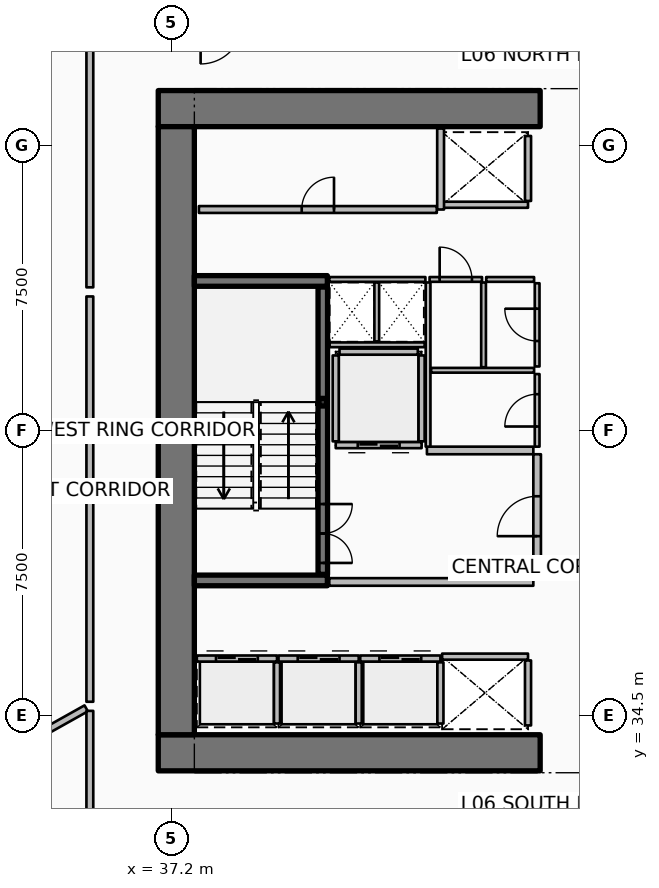
"""IFC4 building model, lengths in metres.
Left out: names, types, materials, properties, quantities, classifications, styles, units other than length and angle.
Written with IfcOpenShell. Run it as: python <this file> out.ifc"""

import sys

from ifc_helpers import new_model, si_unit, direction, frame, frame_2d, origin, origin_2d, place, context, subcontext, project, spatial, rectangle, hollow_rectangle, extrude, element, fill, save


model = new_model("IFC4")
c1 = context("Model", 3, precision=1e-05, world=origin(), true_north=direction((0.0, 1.0)))
c2 = subcontext(c1, "Body", "Model", "MODEL_VIEW")
j1 = project(units=[si_unit("LENGTHUNIT", "METRE"), si_unit("PLANEANGLEUNIT", "RADIAN")], contexts=[c1])
p1 = place(None, origin())
s1 = spatial("IfcSite", under=j1, at=p1, CompositionType="ELEMENT")
p2 = place(p1, origin())
s2 = spatial("IfcBuilding", under=s1, at=p2, CompositionType="ELEMENT")
p3 = place(p2, frame((0.0, 0.0, 30.15)))
s3 = spatial("IfcBuildingStorey", under=s2, at=p3, CompositionType="ELEMENT", Elevation=30.15)
for number, where, z_axis, x_axis in (
    (1, (36.85, 33.525, 0.0), (0.0, 0.0, 1.0), (1.0, 0.0, 0.0)),
    (2, (36.85, 50.475, 0.0), (0.0, 0.0, 1.0), (1.0, 0.0, 0.0)),
):
    element("IfcWall", number, at=place(p3, frame(where, z_axis=z_axis, x_axis=x_axis)), inside=s3, PredefinedType="SHEAR", context=c2, shape_type="SweptSolid", body=[
        extrude(rectangle(XDim=10.05, YDim=0.95, at=frame_2d((5.025, 0.0))), origin(), (0.0, 0.0, 1.0), 3.75),
    ])
p4 = place(p3, frame((37.325, 34.0, 0.0), z_axis=(0.0, 0.0, 1.0), x_axis=(0.0, 1.0, 0.0)))
e3 = element("IfcWall", 3, at=p4, inside=s3, PredefinedType="SHEAR", context=c2, shape_type="SweptSolid", body=[
    extrude(rectangle(XDim=16.0, YDim=0.95, at=frame_2d((8.0, 0.0))), origin(), (0.0, 0.0, 1.0), 3.75),
])
for number, where, z_axis, x_axis in (
    (4, (37.8, 38.06, 0.0), (0.0, 0.0, 1.0), (1.0, 0.0, 0.0)),
    (5, (37.8, 45.94, 0.0), (0.0, 0.0, 1.0), (1.0, 0.0, 0.0)),
):
    element("IfcWall", number, at=place(p3, frame(where, z_axis=z_axis, x_axis=x_axis)), inside=s3, PredefinedType="SHEAR", context=c2, shape_type="SweptSolid", body=[
        extrude(rectangle(XDim=3.5, YDim=0.28, at=frame_2d((1.75, 0.0))), origin(), (0.0, 0.0, 1.0), 3.75),
    ])
p5 = place(p3, frame((41.18, 42.75, 0.0), z_axis=(0.0, 0.0, 1.0), x_axis=(1.0, 0.0, 0.0)))
e6 = element("IfcColumn", 6, at=p5, inside=s3, PredefinedType="COLUMN", context=c2, shape_type="SweptSolid", body=[
    extrude(hollow_rectangle(XDim=0.2, YDim=0.2, WallThickness=0.01, InnerFilletRadius=0.01, OuterFilletRadius=0.02, at=origin_2d()), origin(), (0.0, 0.0, 1.0), 1.67),
])
p6 = place(p3, frame((41.18, 38.22, 0.0), z_axis=(0.0, 0.0, 1.0), x_axis=(0.0, 1.0, 0.0)))
e7 = element("IfcWall", 7, at=p6, inside=s3, PredefinedType="SOLIDWALL", context=c2, shape_type="SweptSolid", body=[
    extrude(rectangle(XDim=7.56, YDim=0.25, at=frame_2d((3.78, 0.0))), origin(), (0.0, 0.0, 1.0), 3.5),
])
p7 = place(p6, frame((0.3, 0.0, 0.0)))
e8 = element("IfcOpeningElement", 8, at=p7, cuts=e7, PredefinedType="OPENING", context=c2, shape_type="SweptSolid", body=[
    extrude(rectangle(XDim=1.55, YDim=2.15, at=frame_2d((0.775, 1.075))), frame((0.0, 0.135, 0.0), z_axis=(0.0, -1.0, 0.0), x_axis=(1.0, 0.0, 0.0)), (0.0, 0.0, 1.0), 0.27),
])
p8 = place(p3, frame((37.865, 36.005, 0.0), z_axis=(0.0, 0.0, 1.0), x_axis=(1.0, 0.0, 0.0)))
e9 = element("IfcWall", 9, at=p8, inside=s3, PredefinedType="PARTITIONING", context=c2, shape_type="SweptSolid", body=[
    extrude(rectangle(XDim=2.11, YDim=0.16, at=frame_2d((1.055, 0.0))), origin(), (0.0, 0.0, 1.0), 3.5),
])
p9 = place(p8, frame((0.505, 0.0, 0.0)))
e10 = element("IfcOpeningElement", 10, at=p9, cuts=e9, PredefinedType="OPENING", context=c2, shape_type="SweptSolid", body=[
    extrude(rectangle(XDim=1.1, YDim=2.1, at=frame_2d((0.55, 1.05))), frame((0.0, 0.09, 0.0), z_axis=(0.0, -1.0, 0.0), x_axis=(1.0, 0.0, 0.0)), (0.0, 0.0, 1.0), 0.18),
])
p10 = place(p3, frame((39.975, 34.295, 0.0), z_axis=(0.0, 0.0, 1.0), x_axis=(0.0, 1.0, 0.0)))
e11 = element("IfcWall", 11, at=p10, inside=s3, PredefinedType="PARTITIONING", context=c2, shape_type="SweptSolid", body=[
    extrude(rectangle(XDim=1.61, YDim=0.16, at=frame_2d((0.805, 0.0))), origin(), (0.0, 0.0, 1.0), 3.5),
])
p11 = place(p3, frame((40.015, 36.005, 0.0), z_axis=(0.0, 0.0, 1.0), x_axis=(1.0, 0.0, 0.0)))
e12 = element("IfcWall", 12, at=p11, inside=s3, PredefinedType="PARTITIONING", context=c2, shape_type="SweptSolid", body=[
    extrude(rectangle(XDim=2.11, YDim=0.16, at=frame_2d((1.055, 0.0))), origin(), (0.0, 0.0, 1.0), 3.5),
])
p12 = place(p11, frame((0.505, 0.0, 0.0)))
e13 = element("IfcOpeningElement", 13, at=p12, cuts=e12, PredefinedType="OPENING", context=c2, shape_type="SweptSolid", body=[
    extrude(rectangle(XDim=1.1, YDim=2.1, at=frame_2d((0.55, 1.05))), frame((0.0, 0.09, 0.0), z_axis=(0.0, -1.0, 0.0), x_axis=(1.0, 0.0, 0.0)), (0.0, 0.0, 1.0), 0.18),
])
p13 = place(p3, frame((42.125, 34.295, 0.0), z_axis=(0.0, 0.0, 1.0), x_axis=(0.0, 1.0, 0.0)))
e14 = element("IfcWall", 14, at=p13, inside=s3, PredefinedType="PARTITIONING", context=c2, shape_type="SweptSolid", body=[
    extrude(rectangle(XDim=1.61, YDim=0.16, at=frame_2d((0.805, 0.0))), origin(), (0.0, 0.0, 1.0), 3.5),
])
p14 = place(p3, frame((42.165, 36.005, 0.0), z_axis=(0.0, 0.0, 1.0), x_axis=(1.0, 0.0, 0.0)))
e15 = element("IfcWall", 15, at=p14, inside=s3, PredefinedType="PARTITIONING", context=c2, shape_type="SweptSolid", body=[
    extrude(rectangle(XDim=2.11, YDim=0.16, at=frame_2d((1.055, 0.0))), origin(), (0.0, 0.0, 1.0), 3.5),
])
p15 = place(p14, frame((0.505, 0.0, 0.0)))
e16 = element("IfcOpeningElement", 16, at=p15, cuts=e15, PredefinedType="OPENING", context=c2, shape_type="SweptSolid", body=[
    extrude(rectangle(XDim=1.1, YDim=2.1, at=frame_2d((0.55, 1.05))), frame((0.0, 0.09, 0.0), z_axis=(0.0, -1.0, 0.0), x_axis=(1.0, 0.0, 0.0)), (0.0, 0.0, 1.0), 0.18),
])
p16 = place(p3, frame((44.275, 34.295, 0.0), z_axis=(0.0, 0.0, 1.0), x_axis=(0.0, 1.0, 0.0)))
e17 = element("IfcWall", 17, at=p16, inside=s3, PredefinedType="PARTITIONING", context=c2, shape_type="SweptSolid", body=[
    extrude(rectangle(XDim=1.61, YDim=0.16, at=frame_2d((0.805, 0.0))), origin(), (0.0, 0.0, 1.0), 3.5),
])
p17 = place(p3, frame((46.58, 47.945, 0.0), z_axis=(0.0, 0.0, 1.0), x_axis=(-1.0, 0.0, 0.0)))
e18 = element("IfcWall", 18, at=p17, inside=s3, PredefinedType="PARTITIONING", context=c2, shape_type="SweptSolid", body=[
    extrude(rectangle(XDim=2.26, YDim=0.16, at=frame_2d((1.13, 0.0))), origin(), (0.0, 0.0, 1.0), 3.5),
])
p18 = place(p3, frame((46.58, 48.045, 0.0), z_axis=(0.0, 0.0, 1.0), x_axis=(0.0, 1.0, 0.0)))
e19 = element("IfcWall", 19, at=p18, inside=s3, PredefinedType="PARTITIONING", context=c2, shape_type="SweptSolid", body=[
    extrude(rectangle(XDim=1.71, YDim=0.16, at=frame_2d((0.855, 0.0))), origin(), (0.0, 0.0, 1.0), 3.5),
])
p19 = place(p3, frame((44.32, 36.055, 0.0), z_axis=(0.0, 0.0, 1.0), x_axis=(1.0, 0.0, 0.0)))
e20 = element("IfcWall", 20, at=p19, inside=s3, PredefinedType="PARTITIONING", context=c2, shape_type="SweptSolid", body=[
    extrude(rectangle(XDim=2.26, YDim=0.16, at=frame_2d((1.13, 0.0))), origin(), (0.0, 0.0, 1.0), 3.5),
])
p20 = place(p3, frame((46.58, 34.245, 0.0), z_axis=(0.0, 0.0, 1.0), x_axis=(0.0, 1.0, 0.0)))
e21 = element("IfcWall", 21, at=p20, inside=s3, PredefinedType="PARTITIONING", context=c2, shape_type="SweptSolid", body=[
    extrude(rectangle(XDim=1.71, YDim=0.16, at=frame_2d((0.855, 0.0))), origin(), (0.0, 0.0, 1.0), 3.5),
])
p21 = place(p3, frame((43.78, 41.62, 0.0), z_axis=(0.0, 0.0, 1.0), x_axis=(-1.0, 0.0, 0.0)))
e22 = element("IfcWall", 22, at=p21, inside=s3, PredefinedType="PARTITIONING", context=c2, shape_type="SweptSolid", body=[
    extrude(rectangle(XDim=2.26, YDim=0.16, at=frame_2d((1.13, 0.0))), origin(), (0.0, 0.0, 1.0), 3.5),
])
p22 = place(p21, frame((0.58, 0.0, 0.0)))
e23 = element("IfcOpeningElement", 23, at=p22, cuts=e22, PredefinedType="OPENING", context=c2, shape_type="SweptSolid", body=[
    extrude(rectangle(XDim=1.1, YDim=2.1, at=frame_2d((0.55, 1.05))), frame((0.0, 0.09, 0.0), z_axis=(0.0, -1.0, 0.0), x_axis=(1.0, 0.0, 0.0)), (0.0, 0.0, 1.0), 0.18),
])
for number, where, z_axis, x_axis in (
    (24, (43.78, 41.72, 0.0), (0.0, 0.0, 1.0), (0.0, 1.0, 0.0)),
    (25, (41.52, 41.72, 0.0), (0.0, 0.0, 1.0), (0.0, 1.0, 0.0)),
):
    element("IfcWall", number, at=place(p3, frame(where, z_axis=z_axis, x_axis=x_axis)), inside=s3, PredefinedType="PARTITIONING", context=c2, shape_type="SweptSolid", body=[
        extrude(rectangle(XDim=2.26, YDim=0.16, at=frame_2d((1.13, 0.0))), origin(), (0.0, 0.0, 1.0), 3.5),
    ])
p23 = place(p3, frame((41.62, 44.08, 0.0), z_axis=(0.0, 0.0, 1.0), x_axis=(1.0, 0.0, 0.0)))
e26 = element("IfcWall", 26, at=p23, inside=s3, PredefinedType="PARTITIONING", context=c2, shape_type="SweptSolid", body=[
    extrude(rectangle(XDim=2.06, YDim=0.16, at=frame_2d((1.03, 0.0))), origin(), (0.0, 0.0, 1.0), 3.5),
])
p24 = place(p3, frame((37.92, 47.82, 0.0), z_axis=(0.0, 0.0, 1.0), x_axis=(1.0, 0.0, 0.0)))
e27 = element("IfcWall", 27, at=p24, inside=s3, PredefinedType="PARTITIONING", context=c2, shape_type="SweptSolid", body=[
    extrude(rectangle(XDim=6.26, YDim=0.18, at=frame_2d((3.13, 0.0))), origin(), (0.0, 0.0, 1.0), 3.5),
])
p25 = place(p24, frame((2.705, 0.0, 0.0)))
e28 = element("IfcOpeningElement", 28, at=p25, cuts=e27, PredefinedType="OPENING", context=c2, shape_type="SweptSolid", body=[
    extrude(rectangle(XDim=0.85, YDim=2.06, at=frame_2d((0.425, 1.03))), frame((0.0, 0.1, 0.0), z_axis=(0.0, -1.0, 0.0), x_axis=(1.0, 0.0, 0.0)), (0.0, 0.0, 1.0), 0.2),
])
p26 = place(p3, frame((44.28, 47.82, 0.0), z_axis=(0.0, 0.0, 1.0), x_axis=(0.0, 1.0, 0.0)))
e29 = element("IfcWall", 29, at=p26, inside=s3, PredefinedType="PARTITIONING", context=c2, shape_type="SweptSolid", body=[
    extrude(rectangle(XDim=2.13, YDim=0.18, at=frame_2d((1.065, 0.0))), origin(), (0.0, 0.0, 1.0), 3.5),
])
p27 = place(p3, frame((41.35, 38.02, 0.0), z_axis=(0.0, 0.0, 1.0), x_axis=(1.0, 0.0, 0.0)))
e30 = element("IfcWall", 30, at=p27, inside=s3, PredefinedType="PARTITIONING", context=c2, shape_type="SweptSolid", body=[
    extrude(rectangle(XDim=5.37, YDim=0.2, at=frame_2d((2.685, 0.0))), origin(), (0.0, 0.0, 1.0), 3.5),
])
p28 = place(p3, frame((43.92, 41.48, 0.0), z_axis=(0.0, 0.0, 1.0), x_axis=(1.0, 0.0, 0.0)))
e31 = element("IfcWall", 31, at=p28, inside=s3, PredefinedType="PARTITIONING", context=c2, shape_type="SweptSolid", body=[
    extrude(rectangle(XDim=2.8, YDim=0.2, at=frame_2d((1.4, 0.0))), origin(), (0.0, 0.0, 1.0), 3.5),
])
p29 = place(p3, frame((46.82, 38.12, 0.0), z_axis=(0.0, 0.0, 1.0), x_axis=(0.0, 1.0, 0.0)))
e32 = element("IfcWall", 32, at=p29, inside=s3, PredefinedType="PARTITIONING", context=c2, shape_type="SweptSolid", body=[
    extrude(rectangle(XDim=3.26, YDim=0.2, at=frame_2d((1.63, 0.0))), origin(), (0.0, 0.0, 1.0), 3.5),
])
p30 = place(p29, frame((1.105, 0.0, 0.0)))
e33 = element("IfcOpeningElement", 33, at=p30, cuts=e32, PredefinedType="OPENING", context=c2, shape_type="SweptSolid", body=[
    extrude(rectangle(XDim=1.05, YDim=2.1, at=frame_2d((0.525, 1.05))), frame((0.0, 0.11, 0.0), z_axis=(0.0, -1.0, 0.0), x_axis=(1.0, 0.0, 0.0)), (0.0, 0.0, 1.0), 0.22),
])
p31 = place(p3, frame((41.36, 44.26, 0.0), z_axis=(0.0, 0.0, 1.0), x_axis=(1.0, 0.0, 0.0)))
e34 = element("IfcWall", 34, at=p31, inside=s3, PredefinedType="PARTITIONING", context=c2, shape_type="SweptSolid", body=[
    extrude(rectangle(XDim=2.5, YDim=0.125, at=frame_2d((1.25, 0.0))), origin(), (0.0, 0.0, 1.0), 2.94),
])
p32 = place(p3, frame((42.6, 44.35, 0.0), z_axis=(0.0, 0.0, 1.0), x_axis=(0.0, 1.0, 0.0)))
e35 = element("IfcWall", 35, at=p32, inside=s3, PredefinedType="PARTITIONING", context=c2, shape_type="SweptSolid", body=[
    extrude(rectangle(XDim=1.55, YDim=0.125, at=frame_2d((0.775, 0.0))), origin(), (0.0, 0.0, 1.0), 2.94),
])
p33 = place(p3, frame((43.95, 41.58, 0.0), z_axis=(0.0, 0.0, 1.0), x_axis=(0.0, 1.0, 0.0)))
e36 = element("IfcWall", 36, at=p33, inside=s3, PredefinedType="PARTITIONING", context=c2, shape_type="SweptSolid", body=[
    extrude(rectangle(XDim=4.32, YDim=0.125, at=frame_2d((2.16, 0.0))), origin(), (0.0, 0.0, 1.0), 2.94),
])
p34 = place(p3, frame((44.03, 43.59, 0.0), z_axis=(0.0, 0.0, 1.0), x_axis=(1.0, 0.0, 0.0)))
e37 = element("IfcWall", 37, at=p34, inside=s3, PredefinedType="PARTITIONING", context=c2, shape_type="SweptSolid", body=[
    extrude(rectangle(XDim=2.71, YDim=0.125, at=frame_2d((1.355, 0.0))), origin(), (0.0, 0.0, 1.0), 2.94),
])
p35 = place(p3, frame((45.41, 43.67, 0.0), z_axis=(0.0, 0.0, 1.0), x_axis=(0.0, 1.0, 0.0)))
e38 = element("IfcWall", 38, at=p35, inside=s3, PredefinedType="PARTITIONING", context=c2, shape_type="SweptSolid", body=[
    extrude(rectangle(XDim=2.23, YDim=0.125, at=frame_2d((1.115, 0.0))), origin(), (0.0, 0.0, 1.0), 2.94),
])
p36 = place(p3, frame((46.82, 41.58, 0.0), z_axis=(0.0, 0.0, 1.0), x_axis=(0.0, 1.0, 0.0)))
e39 = element("IfcWall", 39, at=p36, inside=s3, PredefinedType="PARTITIONING", context=c2, shape_type="SweptSolid", body=[
    extrude(rectangle(XDim=1.91, YDim=0.125, at=frame_2d((0.955, 0.0))), origin(), (0.0, 0.0, 1.0), 2.94),
])
p37 = place(p36, frame((0.53, 0.0, 0.0)))
e40 = element("IfcOpeningElement", 40, at=p37, cuts=e39, PredefinedType="OPENING", context=c2, shape_type="SweptSolid", body=[
    extrude(rectangle(XDim=0.85, YDim=2.06, at=frame_2d((0.425, 1.03))), frame((0.0, 0.073, 0.0), z_axis=(0.0, -1.0, 0.0), x_axis=(1.0, 0.0, 0.0)), (0.0, 0.0, 1.0), 0.145),
])
p38 = place(p3, frame((46.82, 43.69, 0.0), z_axis=(0.0, 0.0, 1.0), x_axis=(0.0, 1.0, 0.0)))
e41 = element("IfcWall", 41, at=p38, inside=s3, PredefinedType="PARTITIONING", context=c2, shape_type="SweptSolid", body=[
    extrude(rectangle(XDim=2.19, YDim=0.125, at=frame_2d((1.095, 0.0))), origin(), (0.0, 0.0, 1.0), 2.94),
])
p39 = place(p38, frame((0.67, 0.0, 0.0)))
e42 = element("IfcOpeningElement", 42, at=p39, cuts=e41, PredefinedType="OPENING", context=c2, shape_type="SweptSolid", body=[
    extrude(rectangle(XDim=0.85, YDim=2.06, at=frame_2d((0.425, 1.03))), frame((0.0, 0.073, 0.0), z_axis=(0.0, -1.0, 0.0), x_axis=(1.0, 0.0, 0.0)), (0.0, 0.0, 1.0), 0.145),
])
p40 = place(p3, frame((41.35, 45.98, 0.0), z_axis=(0.0, 0.0, 1.0), x_axis=(1.0, 0.0, 0.0)))
e43 = element("IfcWall", 43, at=p40, inside=s3, PredefinedType="PARTITIONING", context=c2, shape_type="SweptSolid", body=[
    extrude(rectangle(XDim=2.53, YDim=0.125, at=frame_2d((1.265, 0.0))), origin(), (0.0, 0.0, 1.0), 2.94),
])
p41 = place(p3, frame((43.99, 45.98, 0.0), z_axis=(0.0, 0.0, 1.0), x_axis=(1.0, 0.0, 0.0)))
e44 = element("IfcWall", 44, at=p41, inside=s3, PredefinedType="PARTITIONING", context=c2, shape_type="SweptSolid", body=[
    extrude(rectangle(XDim=1.38, YDim=0.125, at=frame_2d((0.69, 0.0))), origin(), (0.0, 0.0, 1.0), 2.94),
])
p42 = place(p41, frame((0.265, 0.0, 0.0)))
e45 = element("IfcOpeningElement", 45, at=p42, cuts=e44, PredefinedType="OPENING", context=c2, shape_type="SweptSolid", body=[
    extrude(rectangle(XDim=0.85, YDim=2.06, at=frame_2d((0.425, 1.03))), frame((0.0, 0.073, 0.0), z_axis=(0.0, -1.0, 0.0), x_axis=(1.0, 0.0, 0.0)), (0.0, 0.0, 1.0), 0.145),
])
p43 = place(p3, frame((45.48, 45.98, 0.0), z_axis=(0.0, 0.0, 1.0), x_axis=(1.0, 0.0, 0.0)))
e46 = element("IfcWall", 46, at=p43, inside=s3, PredefinedType="PARTITIONING", context=c2, shape_type="SweptSolid", body=[
    extrude(rectangle(XDim=1.26, YDim=0.125, at=frame_2d((0.63, 0.0))), origin(), (0.0, 0.0, 1.0), 2.94),
])
p44 = place(p3, frame((34.954, 34.694, 0.0), z_axis=(0.0, 0.0, 1.0), x_axis=(-0.872493465611, -0.488625779577, 0.0)))
e47 = element("IfcWall", 47, at=p44, inside=s3, PredefinedType="PARTITIONING", context=c2, shape_type="SweptSolid", body=[
    extrude(rectangle(XDim=16.586, YDim=0.18, at=frame_2d((8.293, 0.0))), origin(), (0.0, 0.0, 1.0), 2.867),
])
p45 = place(p3, frame((35.05, 52.089, 0.0), z_axis=(0.0, 0.0, 1.0), x_axis=(0.0, -1.0, 0.0)))
e48 = element("IfcWall", 48, at=p45, inside=s3, PredefinedType="PARTITIONING", context=c2, shape_type="SweptSolid", body=[
    extrude(rectangle(XDim=6.317, YDim=0.18, at=frame_2d((3.158, 0.0))), origin(), (0.0, 0.0, 1.0), 2.867),
])
p46 = place(p3, frame((35.05, 45.532, 0.0), z_axis=(0.0, 0.0, 1.0), x_axis=(0.0, -1.0, 0.0)))
e49 = element("IfcWall", 49, at=p46, inside=s3, PredefinedType="PARTITIONING", context=c2, shape_type="SweptSolid", body=[
    extrude(rectangle(XDim=4.945, YDim=0.18, at=frame_2d((2.472, 0.0))), origin(), (0.0, 0.0, 1.0), 2.867),
])
p47 = place(p3, frame((35.05, 40.347, 0.0), z_axis=(0.0, 0.0, 1.0), x_axis=(0.0, -1.0, 0.0)))
e50 = element("IfcWall", 50, at=p47, inside=s3, PredefinedType="PARTITIONING", context=c2, shape_type="SweptSolid", body=[
    extrude(rectangle(XDim=5.48, YDim=0.18, at=frame_2d((2.74, 0.0))), origin(), (0.0, 0.0, 1.0), 2.867),
])
p48 = place(p3, frame((35.05, 34.628, 0.0), z_axis=(0.0, 0.0, 1.0), x_axis=(0.0, -1.0, 0.0)))
e51 = element("IfcWall", 51, at=p48, inside=s3, PredefinedType="PARTITIONING", context=c2, shape_type="SweptSolid", body=[
    extrude(rectangle(XDim=3.258, YDim=0.18, at=frame_2d((1.629, 0.0))), origin(), (0.0, 0.0, 1.0), 2.867),
])
p49 = place(p7, origin())
e52 = element("IfcDoor", 52, at=p49, inside=s3, OperationType="DOUBLE_DOOR_SINGLE_SWING", PredefinedType="DOOR", context=c2, shape_type="SweptSolid", body=[
    extrude(rectangle(XDim=1.55, YDim=2.15, at=frame_2d((0.775, 1.075))), frame((0.0, 0.025, 0.0), z_axis=(0.0, -1.0, 0.0), x_axis=(1.0, 0.0, 0.0)), (0.0, 0.0, 1.0), 0.05),
])
fill(e8, e52)
p50 = place(p9, origin())
e53 = element("IfcDoor", 53, at=p50, inside=s3, OperationType="DOUBLE_DOOR_SLIDING", PredefinedType="DOOR", context=c2, shape_type="SweptSolid", body=[
    extrude(rectangle(XDim=1.1, YDim=2.1, at=frame_2d((0.55, 1.05))), frame((0.0, 0.025, 0.0), z_axis=(0.0, -1.0, 0.0), x_axis=(1.0, 0.0, 0.0)), (0.0, 0.0, 1.0), 0.05),
])
fill(e10, e53)
p51 = place(p12, origin())
e54 = element("IfcDoor", 54, at=p51, inside=s3, OperationType="DOUBLE_DOOR_SLIDING", PredefinedType="DOOR", context=c2, shape_type="SweptSolid", body=[
    extrude(rectangle(XDim=1.1, YDim=2.1, at=frame_2d((0.55, 1.05))), frame((0.0, 0.025, 0.0), z_axis=(0.0, -1.0, 0.0), x_axis=(1.0, 0.0, 0.0)), (0.0, 0.0, 1.0), 0.05),
])
fill(e13, e54)
p52 = place(p15, origin())
e55 = element("IfcDoor", 55, at=p52, inside=s3, OperationType="DOUBLE_DOOR_SLIDING", PredefinedType="DOOR", context=c2, shape_type="SweptSolid", body=[
    extrude(rectangle(XDim=1.1, YDim=2.1, at=frame_2d((0.55, 1.05))), frame((0.0, 0.025, 0.0), z_axis=(0.0, -1.0, 0.0), x_axis=(1.0, 0.0, 0.0)), (0.0, 0.0, 1.0), 0.05),
])
fill(e16, e55)
p53 = place(p22, origin())
e56 = element("IfcDoor", 56, at=p53, inside=s3, OperationType="DOUBLE_DOOR_SLIDING", PredefinedType="DOOR", context=c2, shape_type="SweptSolid", body=[
    extrude(rectangle(XDim=1.1, YDim=2.1, at=frame_2d((0.55, 1.05))), frame((0.0, 0.025, 0.0), z_axis=(0.0, -1.0, 0.0), x_axis=(1.0, 0.0, 0.0)), (0.0, 0.0, 1.0), 0.05),
])
fill(e23, e56)
p54 = place(p25, origin())
e57 = element("IfcDoor", 57, at=p54, inside=s3, OperationType="SINGLE_SWING_RIGHT", PredefinedType="DOOR", context=c2, shape_type="SweptSolid", body=[
    extrude(rectangle(XDim=0.85, YDim=2.06, at=frame_2d((0.425, 1.03))), frame((0.0, 0.025, 0.0), z_axis=(0.0, -1.0, 0.0), x_axis=(1.0, 0.0, 0.0)), (0.0, 0.0, 1.0), 0.05),
])
fill(e28, e57)
p55 = place(p30, origin())
e58 = element("IfcDoor", 58, at=p55, inside=s3, OperationType="SINGLE_SWING_LEFT", PredefinedType="DOOR", context=c2, shape_type="SweptSolid", body=[
    extrude(rectangle(XDim=1.05, YDim=2.1, at=frame_2d((0.525, 1.05))), frame((0.0, 0.025, 0.0), z_axis=(0.0, -1.0, 0.0), x_axis=(1.0, 0.0, 0.0)), (0.0, 0.0, 1.0), 0.05),
])
fill(e33, e58)
p56 = place(p37, origin())
e59 = element("IfcDoor", 59, at=p56, inside=s3, OperationType="SINGLE_SWING_LEFT", PredefinedType="DOOR", context=c2, shape_type="SweptSolid", body=[
    extrude(rectangle(XDim=0.85, YDim=2.06, at=frame_2d((0.425, 1.03))), frame((0.0, 0.025, 0.0), z_axis=(0.0, -1.0, 0.0), x_axis=(1.0, 0.0, 0.0)), (0.0, 0.0, 1.0), 0.05),
])
fill(e40, e59)
p57 = place(p39, origin())
e60 = element("IfcDoor", 60, at=p57, inside=s3, OperationType="SINGLE_SWING_RIGHT", PredefinedType="DOOR", context=c2, shape_type="SweptSolid", body=[
    extrude(rectangle(XDim=0.85, YDim=2.06, at=frame_2d((0.425, 1.03))), frame((0.0, 0.025, 0.0), z_axis=(0.0, -1.0, 0.0), x_axis=(1.0, 0.0, 0.0)), (0.0, 0.0, 1.0), 0.05),
])
fill(e42, e60)
p58 = place(p42, origin())
e61 = element("IfcDoor", 61, at=p58, inside=s3, OperationType="SINGLE_SWING_LEFT", PredefinedType="DOOR", context=c2, shape_type="SweptSolid", body=[
    extrude(rectangle(XDim=0.85, YDim=2.06, at=frame_2d((0.425, 1.03))), frame((0.0, 0.025, 0.0), z_axis=(0.0, -1.0, 0.0), x_axis=(1.0, 0.0, 0.0)), (0.0, 0.0, 1.0), 0.05),
])
fill(e45, e61)
save(model, sys.argv[1])
